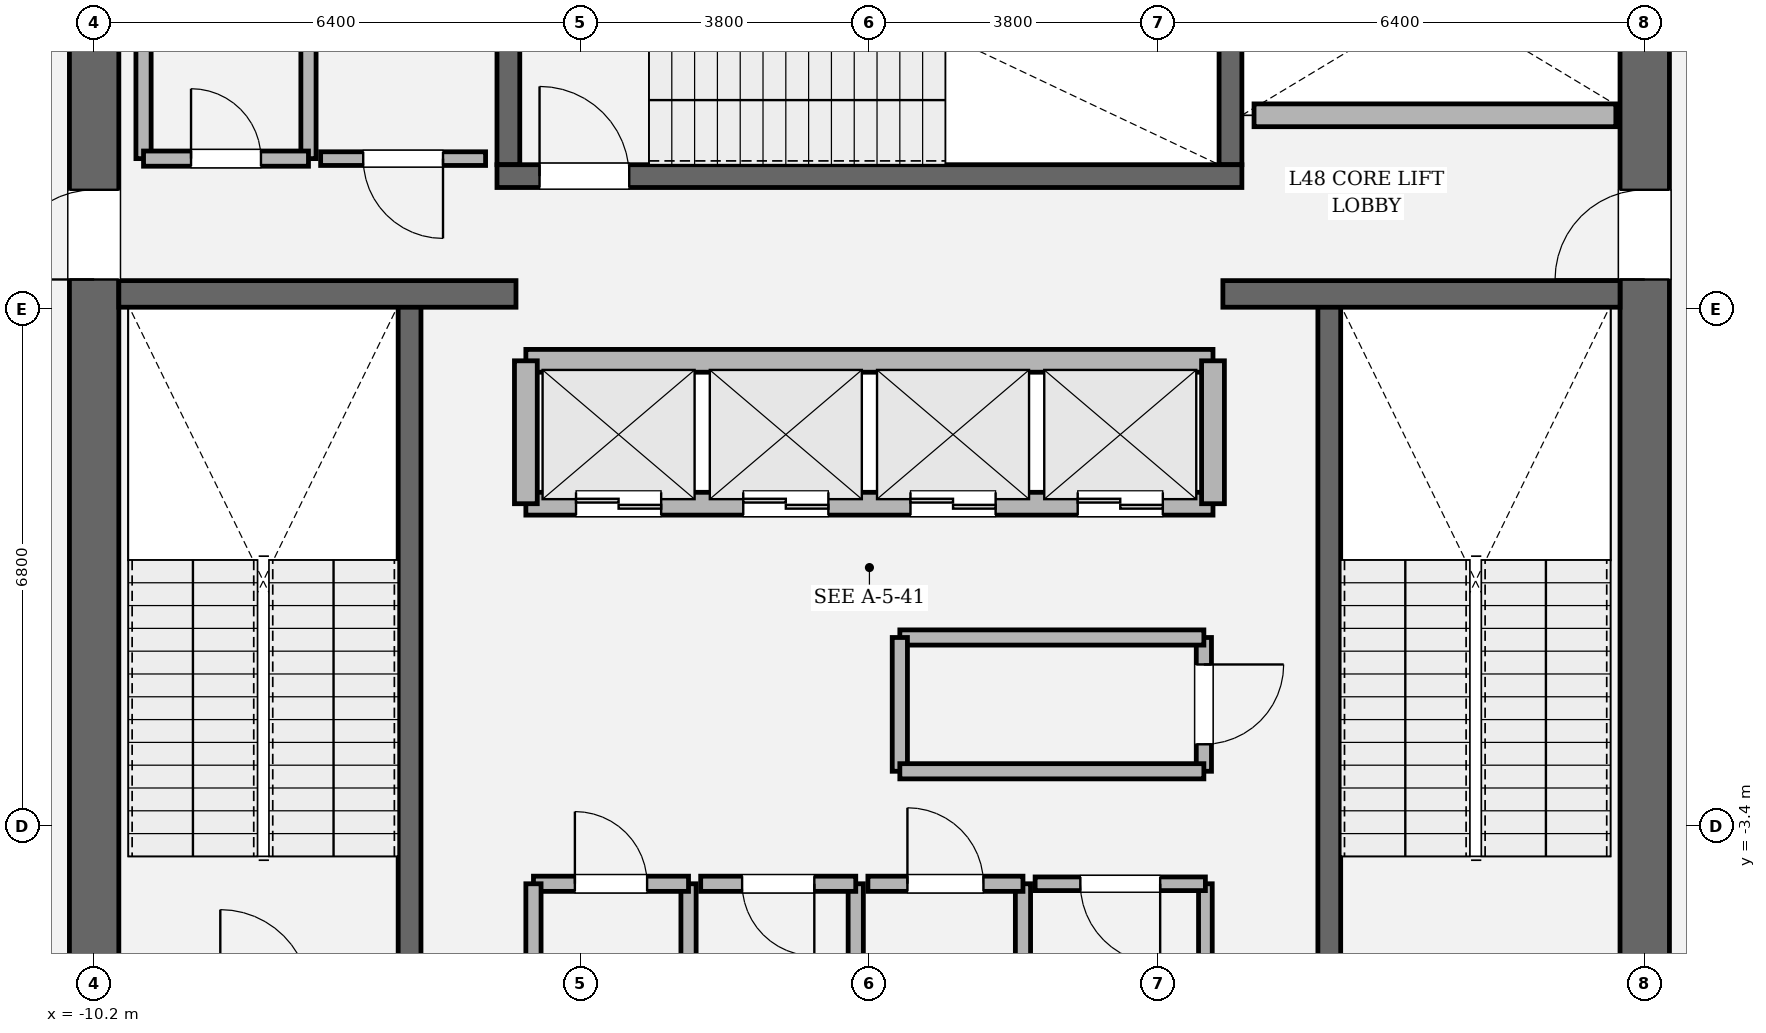
"""IFC4 building model, lengths in metres.
Left out: names, types, materials, properties, quantities, classifications, styles, units other than length and angle.
Written with IfcOpenShell. Run it as: python <this file> out.ifc"""

import sys

from ifc_helpers import new_model, si_unit, direction, frame, frame_2d, origin, place, context, subcontext, project, spatial, rectangle, extrude, element, fill, save


model = new_model("IFC4")
c1 = context("Model", 3, precision=1e-05, world=origin(), true_north=direction((0.0, 1.0)))
c2 = subcontext(c1, "Body", "Model", "MODEL_VIEW")
j1 = project(units=[si_unit("LENGTHUNIT", "METRE"), si_unit("PLANEANGLEUNIT", "RADIAN")], contexts=[c1])
p1 = place(None, origin())
s1 = spatial("IfcSite", under=j1, at=p1, CompositionType="ELEMENT")
p2 = place(p1, origin())
s2 = spatial("IfcBuilding", under=s1, at=p2, CompositionType="ELEMENT")
p3 = place(p2, frame((0.0, 0.0, 204.6)))
s3 = spatial("IfcBuildingStorey", under=s2, at=p3, CompositionType="ELEMENT", Elevation=204.6)
p4 = place(p3, frame((-10.2, -8.875, 0.0), z_axis=(0.0, 0.0, 1.0), x_axis=(0.0, 1.0, 0.0)))
e1 = element("IfcWall", 1, at=p4, inside=s3, PredefinedType="SHEAR", context=c2, shape_type="SweptSolid", body=[
    extrude(rectangle(XDim=17.75, YDim=0.65, at=frame_2d((8.875, 0.0))), origin(), (0.0, 0.0, 1.0), 4.05),
])
p5 = place(p4, frame((12.665, 0.0, 0.0)))
e2 = element("IfcOpeningElement", 2, at=p5, cuts=e1, PredefinedType="OPENING", context=c2, shape_type="SweptSolid", body=[
    extrude(rectangle(XDim=1.18, YDim=2.2, at=frame_2d((0.59, 1.1))), frame((0.0, 0.335, 0.0), z_axis=(0.0, -1.0, 0.0), x_axis=(1.0, 0.0, 0.0)), (0.0, 0.0, 1.0), 0.67),
])
p6 = place(p3, frame((10.2, 8.875, 0.0), z_axis=(0.0, 0.0, 1.0), x_axis=(0.0, -1.0, 0.0)))
e3 = element("IfcWall", 3, at=p6, inside=s3, PredefinedType="SHEAR", context=c2, shape_type="SweptSolid", body=[
    extrude(rectangle(XDim=17.75, YDim=0.65, at=frame_2d((8.875, 0.0))), origin(), (0.0, 0.0, 1.0), 4.05),
])
p7 = place(p6, frame((3.905, 0.0, 0.0)))
e4 = element("IfcOpeningElement", 4, at=p7, cuts=e3, PredefinedType="OPENING", context=c2, shape_type="SweptSolid", body=[
    extrude(rectangle(XDim=1.18, YDim=2.2, at=frame_2d((0.59, 1.1))), frame((0.0, 0.335, 0.0), z_axis=(0.0, -1.0, 0.0), x_axis=(1.0, 0.0, 0.0)), (0.0, 0.0, 1.0), 0.67),
])
for number, where, z_axis, x_axis in (
    (5, (-6.05, -5.5, 0.0), (0.0, 0.0, 1.0), (0.0, 1.0, 0.0)),
    (6, (6.05, 3.45, 0.0), (0.0, 0.0, 1.0), (0.0, -1.0, 0.0)),
):
    element("IfcWall", number, at=place(p3, frame(where, z_axis=z_axis, x_axis=x_axis)), inside=s3, PredefinedType="SOLIDWALL", context=c2, shape_type="SweptSolid", body=[
        extrude(rectangle(XDim=8.95, YDim=0.3, at=frame_2d((4.475, 0.0))), origin(), (0.0, 0.0, 1.0), 4.05),
    ])
for number, where, z_axis, x_axis in (
    (7, (-4.75, 5.3, 0.0), (0.0, 0.0, 1.0), (0.0, 1.0, 0.0)),
    (8, (4.75, 8.875, 0.0), (0.0, 0.0, 1.0), (0.0, -1.0, 0.0)),
):
    element("IfcWall", number, at=place(p3, frame(where, z_axis=z_axis, x_axis=x_axis)), inside=s3, PredefinedType="SOLIDWALL", context=c2, shape_type="SweptSolid", body=[
        extrude(rectangle(XDim=3.575, YDim=0.3, at=frame_2d((1.788, 0.0))), origin(), (0.0, 0.0, 1.0), 4.05),
    ])
p8 = place(p3, frame((-4.9, 5.15, 0.0), z_axis=(0.0, 0.0, 1.0), x_axis=(1.0, 0.0, 0.0)))
e9 = element("IfcWall", 9, at=p8, inside=s3, PredefinedType="SOLIDWALL", context=c2, shape_type="SweptSolid", body=[
    extrude(rectangle(XDim=9.8, YDim=0.3, at=frame_2d((4.9, 0.0))), origin(), (0.0, 0.0, 1.0), 4.05),
])
p9 = place(p8, frame((0.56, 0.0, 0.0)))
e10 = element("IfcOpeningElement", 10, at=p9, cuts=e9, PredefinedType="OPENING", context=c2, shape_type="SweptSolid", body=[
    extrude(rectangle(XDim=1.18, YDim=2.2, at=frame_2d((0.59, 1.1))), frame((0.0, 0.16, 0.0), z_axis=(0.0, -1.0, 0.0), x_axis=(1.0, 0.0, 0.0)), (0.0, 0.0, 1.0), 0.32),
])
for number, where, z_axis, x_axis in (
    (11, (-9.875, 3.6, 0.0), (0.0, 0.0, 1.0), (1.0, 0.0, 0.0)),
    (12, (4.65, 3.6, 0.0), (0.0, 0.0, 1.0), (1.0, 0.0, 0.0)),
):
    element("IfcWall", number, at=place(p3, frame(where, z_axis=z_axis, x_axis=x_axis)), inside=s3, PredefinedType="SOLIDWALL", context=c2, shape_type="SweptSolid", body=[
        extrude(rectangle(XDim=5.225, YDim=0.35, at=frame_2d((2.613, 0.0))), origin(), (0.0, 0.0, 1.0), 4.05),
    ])
p10 = place(p3, frame((-4.52, 0.84, 0.0), z_axis=(0.0, 0.0, 1.0), x_axis=(1.0, 0.0, 0.0)))
e13 = element("IfcWall", 13, at=p10, inside=s3, PredefinedType="SOLIDWALL", context=c2, shape_type="SweptSolid", body=[
    extrude(rectangle(XDim=9.04, YDim=0.3, at=frame_2d((4.52, 0.0))), origin(), (0.0, 0.0, 1.0), 3.83),
])
p11 = place(p10, frame((0.66, 0.0, 0.0)))
e14 = element("IfcOpeningElement", 14, at=p11, cuts=e13, PredefinedType="OPENING", context=c2, shape_type="SweptSolid", body=[
    extrude(rectangle(XDim=1.12, YDim=2.25, at=frame_2d((0.56, 1.125))), frame((0.0, 0.16, 0.0), z_axis=(0.0, -1.0, 0.0), x_axis=(1.0, 0.0, 0.0)), (0.0, 0.0, 1.0), 0.32),
])
p12 = place(p10, frame((2.86, 0.0, 0.0)))
e15 = element("IfcOpeningElement", 15, at=p12, cuts=e13, PredefinedType="OPENING", context=c2, shape_type="SweptSolid", body=[
    extrude(rectangle(XDim=1.12, YDim=2.25, at=frame_2d((0.56, 1.125))), frame((0.0, 0.16, 0.0), z_axis=(0.0, -1.0, 0.0), x_axis=(1.0, 0.0, 0.0)), (0.0, 0.0, 1.0), 0.32),
])
p13 = place(p10, frame((5.06, 0.0, 0.0)))
e16 = element("IfcOpeningElement", 16, at=p13, cuts=e13, PredefinedType="OPENING", context=c2, shape_type="SweptSolid", body=[
    extrude(rectangle(XDim=1.12, YDim=2.25, at=frame_2d((0.56, 1.125))), frame((0.0, 0.16, 0.0), z_axis=(0.0, -1.0, 0.0), x_axis=(1.0, 0.0, 0.0)), (0.0, 0.0, 1.0), 0.32),
])
p14 = place(p10, frame((7.26, 0.0, 0.0)))
e17 = element("IfcOpeningElement", 17, at=p14, cuts=e13, PredefinedType="OPENING", context=c2, shape_type="SweptSolid", body=[
    extrude(rectangle(XDim=1.12, YDim=2.25, at=frame_2d((0.56, 1.125))), frame((0.0, 0.16, 0.0), z_axis=(0.0, -1.0, 0.0), x_axis=(1.0, 0.0, 0.0)), (0.0, 0.0, 1.0), 0.32),
])
p15 = place(p3, frame((-4.52, 2.72, 0.0), z_axis=(0.0, 0.0, 1.0), x_axis=(1.0, 0.0, 0.0)))
e18 = element("IfcWall", 18, at=p15, inside=s3, PredefinedType="SOLIDWALL", context=c2, shape_type="SweptSolid", body=[
    extrude(rectangle(XDim=9.04, YDim=0.3, at=frame_2d((4.52, 0.0))), origin(), (0.0, 0.0, 1.0), 3.83),
])
for number, where, z_axis, x_axis in (
    (19, (-4.52, 0.84, 0.0), (0.0, 0.0, 1.0), (0.0, 1.0, 0.0)),
    (20, (4.52, 0.84, 0.0), (0.0, 0.0, 1.0), (0.0, 1.0, 0.0)),
):
    element("IfcWall", number, at=place(p3, frame(where, z_axis=z_axis, x_axis=x_axis)), inside=s3, PredefinedType="SOLIDWALL", context=c2, shape_type="SweptSolid", body=[
        extrude(rectangle(XDim=1.88, YDim=0.3, at=frame_2d((0.94, 0.0))), origin(), (0.0, 0.0, 1.0), 3.83),
    ])
p16 = place(p3, frame((5.06, 5.95, 0.0), z_axis=(0.0, 0.0, 1.0), x_axis=(1.0, 0.0, 0.0)))
e21 = element("IfcWall", 21, at=p16, inside=s3, PredefinedType="SOLIDWALL", context=c2, shape_type="SweptSolid", body=[
    extrude(rectangle(XDim=4.76, YDim=0.3, at=frame_2d((2.38, 0.0))), origin(), (0.0, 0.0, 1.0), 3.83),
])
p17 = place(p3, frame((-2.38, -5.9, 0.0), z_axis=(0.0, 0.0, 1.0), x_axis=(0.0, 1.0, 0.0)))
e22 = element("IfcWall", 22, at=p17, inside=s3, PredefinedType="SOLIDWALL", context=c2, shape_type="SweptSolid", body=[
    extrude(rectangle(XDim=1.74, YDim=0.2, at=frame_2d((0.87, 0.0))), origin(), (0.0, 0.0, 1.0), 3.83),
])
p18 = place(p3, frame((-2.38, -4.16, 0.0), z_axis=(0.0, 0.0, 1.0), x_axis=(-1.0, 0.0, 0.0)))
e23 = element("IfcWall", 23, at=p18, inside=s3, PredefinedType="SOLIDWALL", context=c2, shape_type="SweptSolid", body=[
    extrude(rectangle(XDim=2.04, YDim=0.2, at=frame_2d((1.02, 0.0))), origin(), (0.0, 0.0, 1.0), 3.83),
])
p19 = place(p18, frame((0.545, 0.0, 0.0)))
e24 = element("IfcOpeningElement", 24, at=p19, cuts=e23, PredefinedType="OPENING", context=c2, shape_type="SweptSolid", body=[
    extrude(rectangle(XDim=0.95, YDim=2.15, at=frame_2d((0.475, 1.075))), frame((0.0, 0.11, 0.0), z_axis=(0.0, -1.0, 0.0), x_axis=(1.0, 0.0, 0.0)), (0.0, 0.0, 1.0), 0.22),
])
for number, where, z_axis, x_axis in (
    (25, (-4.42, -4.16, 0.0), (0.0, 0.0, 1.0), (0.0, -1.0, 0.0)),
    (26, (-0.18, -5.9, 0.0), (0.0, 0.0, 1.0), (0.0, 1.0, 0.0)),
):
    element("IfcWall", number, at=place(p3, frame(where, z_axis=z_axis, x_axis=x_axis)), inside=s3, PredefinedType="SOLIDWALL", context=c2, shape_type="SweptSolid", body=[
        extrude(rectangle(XDim=1.74, YDim=0.2, at=frame_2d((0.87, 0.0))), origin(), (0.0, 0.0, 1.0), 3.83),
    ])
p20 = place(p3, frame((-0.18, -4.16, 0.0), z_axis=(0.0, 0.0, 1.0), x_axis=(-1.0, 0.0, 0.0)))
e27 = element("IfcWall", 27, at=p20, inside=s3, PredefinedType="SOLIDWALL", context=c2, shape_type="SweptSolid", body=[
    extrude(rectangle(XDim=2.04, YDim=0.2, at=frame_2d((1.02, 0.0))), origin(), (0.0, 0.0, 1.0), 3.83),
])
p21 = place(p20, frame((0.545, 0.0, 0.0)))
e28 = element("IfcOpeningElement", 28, at=p21, cuts=e27, PredefinedType="OPENING", context=c2, shape_type="SweptSolid", body=[
    extrude(rectangle(XDim=0.95, YDim=2.15, at=frame_2d((0.475, 1.075))), frame((0.0, 0.11, 0.0), z_axis=(0.0, -1.0, 0.0), x_axis=(1.0, 0.0, 0.0)), (0.0, 0.0, 1.0), 0.22),
])
p22 = place(p3, frame((2.02, -5.9, 0.0), z_axis=(0.0, 0.0, 1.0), x_axis=(0.0, 1.0, 0.0)))
e29 = element("IfcWall", 29, at=p22, inside=s3, PredefinedType="SOLIDWALL", context=c2, shape_type="SweptSolid", body=[
    extrude(rectangle(XDim=1.74, YDim=0.2, at=frame_2d((0.87, 0.0))), origin(), (0.0, 0.0, 1.0), 3.83),
])
p23 = place(p3, frame((2.02, -4.16, 0.0), z_axis=(0.0, 0.0, 1.0), x_axis=(-1.0, 0.0, 0.0)))
e30 = element("IfcWall", 30, at=p23, inside=s3, PredefinedType="SOLIDWALL", context=c2, shape_type="SweptSolid", body=[
    extrude(rectangle(XDim=2.04, YDim=0.2, at=frame_2d((1.02, 0.0))), origin(), (0.0, 0.0, 1.0), 3.83),
])
p24 = place(p23, frame((0.52, 0.0, 0.0)))
e31 = element("IfcOpeningElement", 31, at=p24, cuts=e30, PredefinedType="OPENING", context=c2, shape_type="SweptSolid", body=[
    extrude(rectangle(XDim=1.0, YDim=2.15, at=frame_2d((0.5, 1.075))), frame((0.0, 0.11, 0.0), z_axis=(0.0, -1.0, 0.0), x_axis=(1.0, 0.0, 0.0)), (0.0, 0.0, 1.0), 0.22),
])
p25 = place(p3, frame((4.42, -5.9, 0.0), z_axis=(0.0, 0.0, 1.0), x_axis=(0.0, 1.0, 0.0)))
e32 = element("IfcWall", 32, at=p25, inside=s3, PredefinedType="PARTITIONING", context=c2, shape_type="SweptSolid", body=[
    extrude(rectangle(XDim=1.74, YDim=0.18, at=frame_2d((0.87, 0.0))), origin(), (0.0, 0.0, 1.0), 3.83),
])
p26 = place(p3, frame((4.42, -4.16, 0.0), z_axis=(0.0, 0.0, 1.0), x_axis=(-1.0, 0.0, 0.0)))
e33 = element("IfcWall", 33, at=p26, inside=s3, PredefinedType="PARTITIONING", context=c2, shape_type="SweptSolid", body=[
    extrude(rectangle(XDim=2.24, YDim=0.18, at=frame_2d((1.12, 0.0))), origin(), (0.0, 0.0, 1.0), 3.83),
])
p27 = place(p26, frame((0.595, 0.0, 0.0)))
e34 = element("IfcOpeningElement", 34, at=p27, cuts=e33, PredefinedType="OPENING", context=c2, shape_type="SweptSolid", body=[
    extrude(rectangle(XDim=1.05, YDim=2.2, at=frame_2d((0.525, 1.1))), frame((0.0, 0.1, 0.0), z_axis=(0.0, -1.0, 0.0), x_axis=(1.0, 0.0, 0.0)), (0.0, 0.0, 1.0), 0.2),
])
p28 = place(p3, frame((4.4, -2.68, 0.0), z_axis=(0.0, 0.0, 1.0), x_axis=(0.0, 1.0, 0.0)))
e35 = element("IfcWall", 35, at=p28, inside=s3, PredefinedType="SOLIDWALL", context=c2, shape_type="SweptSolid", body=[
    extrude(rectangle(XDim=1.76, YDim=0.2, at=frame_2d((0.88, 0.0))), origin(), (0.0, 0.0, 1.0), 3.83),
])
p29 = place(p28, frame((0.355, 0.0, 0.0)))
e36 = element("IfcOpeningElement", 36, at=p29, cuts=e35, PredefinedType="OPENING", context=c2, shape_type="SweptSolid", body=[
    extrude(rectangle(XDim=1.05, YDim=2.2, at=frame_2d((0.525, 1.1))), frame((0.0, 0.11, 0.0), z_axis=(0.0, -1.0, 0.0), x_axis=(1.0, 0.0, 0.0)), (0.0, 0.0, 1.0), 0.22),
])
p30 = place(p3, frame((4.4, -0.92, 0.0), z_axis=(0.0, 0.0, 1.0), x_axis=(-1.0, 0.0, 0.0)))
e37 = element("IfcWall", 37, at=p30, inside=s3, PredefinedType="SOLIDWALL", context=c2, shape_type="SweptSolid", body=[
    extrude(rectangle(XDim=4.0, YDim=0.2, at=frame_2d((2.0, 0.0))), origin(), (0.0, 0.0, 1.0), 3.83),
])
p31 = place(p3, frame((0.4, -0.92, 0.0), z_axis=(0.0, 0.0, 1.0), x_axis=(0.0, -1.0, 0.0)))
e38 = element("IfcWall", 38, at=p31, inside=s3, PredefinedType="SOLIDWALL", context=c2, shape_type="SweptSolid", body=[
    extrude(rectangle(XDim=1.76, YDim=0.2, at=frame_2d((0.88, 0.0))), origin(), (0.0, 0.0, 1.0), 3.83),
])
p32 = place(p3, frame((0.4, -2.68, 0.0), z_axis=(0.0, 0.0, 1.0), x_axis=(1.0, 0.0, 0.0)))
e39 = element("IfcWall", 39, at=p32, inside=s3, PredefinedType="SOLIDWALL", context=c2, shape_type="SweptSolid", body=[
    extrude(rectangle(XDim=4.0, YDim=0.2, at=frame_2d((2.0, 0.0))), origin(), (0.0, 0.0, 1.0), 3.83),
])
for number, where, z_axis, x_axis in (
    (40, (-7.38, 5.38, 0.0), (0.0, 0.0, 1.0), (0.0, 1.0, 0.0)),
    (41, (-9.55, 8.65, 0.0), (0.0, 0.0, 1.0), (0.0, -1.0, 0.0)),
):
    element("IfcWall", number, at=place(p3, frame(where, z_axis=z_axis, x_axis=x_axis)), inside=s3, PredefinedType="SOLIDWALL", context=c2, shape_type="SweptSolid", body=[
        extrude(rectangle(XDim=3.27, YDim=0.2, at=frame_2d((1.635, 0.0))), origin(), (0.0, 0.0, 1.0), 3.83),
    ])
p33 = place(p3, frame((-9.55, 5.38, 0.0), z_axis=(0.0, 0.0, 1.0), x_axis=(1.0, 0.0, 0.0)))
e42 = element("IfcWall", 42, at=p33, inside=s3, PredefinedType="SOLIDWALL", context=c2, shape_type="SweptSolid", body=[
    extrude(rectangle(XDim=2.17, YDim=0.2, at=frame_2d((1.085, 0.0))), origin(), (0.0, 0.0, 1.0), 3.83),
])
p34 = place(p33, frame((0.625, 0.0, 0.0)))
e43 = element("IfcOpeningElement", 43, at=p34, cuts=e42, PredefinedType="OPENING", context=c2, shape_type="SweptSolid", body=[
    extrude(rectangle(XDim=0.92, YDim=2.1, at=frame_2d((0.46, 1.05))), frame((0.0, 0.11, 0.0), z_axis=(0.0, -1.0, 0.0), x_axis=(1.0, 0.0, 0.0)), (0.0, 0.0, 1.0), 0.22),
])
p35 = place(p3, frame((-7.22, 5.38, 0.0), z_axis=(0.0, 0.0, 1.0), x_axis=(1.0, 0.0, 0.0)))
e44 = element("IfcWall", 44, at=p35, inside=s3, PredefinedType="PARTITIONING", context=c2, shape_type="SweptSolid", body=[
    extrude(rectangle(XDim=2.17, YDim=0.18, at=frame_2d((1.085, 0.0))), origin(), (0.0, 0.0, 1.0), 3.83),
])
p36 = place(p35, frame((0.56, 0.0, 0.0)))
e45 = element("IfcOpeningElement", 45, at=p36, cuts=e44, PredefinedType="OPENING", context=c2, shape_type="SweptSolid", body=[
    extrude(rectangle(XDim=1.05, YDim=2.2, at=frame_2d((0.525, 1.1))), frame((0.0, 0.1, 0.0), z_axis=(0.0, -1.0, 0.0), x_axis=(1.0, 0.0, 0.0)), (0.0, 0.0, 1.0), 0.2),
])
p37 = place(p9, origin())
e46 = element("IfcDoor", 46, at=p37, inside=s3, OperationType="SINGLE_SWING_LEFT", PredefinedType="DOOR", context=c2, shape_type="SweptSolid", body=[
    extrude(rectangle(XDim=1.18, YDim=2.2, at=frame_2d((0.59, 1.1))), frame((0.0, 0.025, 0.0), z_axis=(0.0, -1.0, 0.0), x_axis=(1.0, 0.0, 0.0)), (0.0, 0.0, 1.0), 0.05),
])
fill(e10, e46)
p38 = place(p5, origin())
e47 = element("IfcDoor", 47, at=p38, inside=s3, OperationType="SINGLE_SWING_LEFT", PredefinedType="DOOR", context=c2, shape_type="SweptSolid", body=[
    extrude(rectangle(XDim=1.18, YDim=2.2, at=frame_2d((0.59, 1.1))), frame((0.0, 0.025, 0.0), z_axis=(0.0, -1.0, 0.0), x_axis=(1.0, 0.0, 0.0)), (0.0, 0.0, 1.0), 0.05),
])
fill(e2, e47)
p39 = place(p7, origin())
e48 = element("IfcDoor", 48, at=p39, inside=s3, OperationType="SINGLE_SWING_RIGHT", PredefinedType="DOOR", context=c2, shape_type="SweptSolid", body=[
    extrude(rectangle(XDim=1.18, YDim=2.2, at=frame_2d((0.59, 1.1))), frame((0.0, 0.025, 0.0), z_axis=(0.0, -1.0, 0.0), x_axis=(1.0, 0.0, 0.0)), (0.0, 0.0, 1.0), 0.05),
])
fill(e4, e48)
p40 = place(p11, origin())
e49 = element("IfcDoor", 49, at=p40, inside=s3, OperationType="DOUBLE_DOOR_SLIDING", PredefinedType="DOOR", context=c2, shape_type="SweptSolid", body=[
    extrude(rectangle(XDim=1.12, YDim=2.25, at=frame_2d((0.56, 1.125))), frame((0.0, 0.025, 0.0), z_axis=(0.0, -1.0, 0.0), x_axis=(1.0, 0.0, 0.0)), (0.0, 0.0, 1.0), 0.05),
])
fill(e14, e49)
p41 = place(p12, origin())
e50 = element("IfcDoor", 50, at=p41, inside=s3, OperationType="DOUBLE_DOOR_SLIDING", PredefinedType="DOOR", context=c2, shape_type="SweptSolid", body=[
    extrude(rectangle(XDim=1.12, YDim=2.25, at=frame_2d((0.56, 1.125))), frame((0.0, 0.025, 0.0), z_axis=(0.0, -1.0, 0.0), x_axis=(1.0, 0.0, 0.0)), (0.0, 0.0, 1.0), 0.05),
])
fill(e15, e50)
p42 = place(p13, origin())
e51 = element("IfcDoor", 51, at=p42, inside=s3, OperationType="DOUBLE_DOOR_SLIDING", PredefinedType="DOOR", context=c2, shape_type="SweptSolid", body=[
    extrude(rectangle(XDim=1.12, YDim=2.25, at=frame_2d((0.56, 1.125))), frame((0.0, 0.025, 0.0), z_axis=(0.0, -1.0, 0.0), x_axis=(1.0, 0.0, 0.0)), (0.0, 0.0, 1.0), 0.05),
])
fill(e16, e51)
p43 = place(p14, origin())
e52 = element("IfcDoor", 52, at=p43, inside=s3, OperationType="DOUBLE_DOOR_SLIDING", PredefinedType="DOOR", context=c2, shape_type="SweptSolid", body=[
    extrude(rectangle(XDim=1.12, YDim=2.25, at=frame_2d((0.56, 1.125))), frame((0.0, 0.025, 0.0), z_axis=(0.0, -1.0, 0.0), x_axis=(1.0, 0.0, 0.0)), (0.0, 0.0, 1.0), 0.05),
])
fill(e17, e52)
p44 = place(p19, origin())
e53 = element("IfcDoor", 53, at=p44, inside=s3, OperationType="SINGLE_SWING_RIGHT", PredefinedType="DOOR", context=c2, shape_type="SweptSolid", body=[
    extrude(rectangle(XDim=0.95, YDim=2.15, at=frame_2d((0.475, 1.075))), frame((0.0, 0.025, 0.0), z_axis=(0.0, -1.0, 0.0), x_axis=(1.0, 0.0, 0.0)), (0.0, 0.0, 1.0), 0.05),
])
fill(e24, e53)
p45 = place(p21, origin())
e54 = element("IfcDoor", 54, at=p45, inside=s3, OperationType="SINGLE_SWING_LEFT", PredefinedType="DOOR", context=c2, shape_type="SweptSolid", body=[
    extrude(rectangle(XDim=0.95, YDim=2.15, at=frame_2d((0.475, 1.075))), frame((0.0, 0.025, 0.0), z_axis=(0.0, -1.0, 0.0), x_axis=(1.0, 0.0, 0.0)), (0.0, 0.0, 1.0), 0.05),
])
fill(e28, e54)
p46 = place(p24, origin())
e55 = element("IfcDoor", 55, at=p46, inside=s3, OperationType="SINGLE_SWING_RIGHT", PredefinedType="DOOR", context=c2, shape_type="SweptSolid", body=[
    extrude(rectangle(XDim=1.0, YDim=2.15, at=frame_2d((0.5, 1.075))), frame((0.0, 0.025, 0.0), z_axis=(0.0, -1.0, 0.0), x_axis=(1.0, 0.0, 0.0)), (0.0, 0.0, 1.0), 0.05),
])
fill(e31, e55)
p47 = place(p27, origin())
e56 = element("IfcDoor", 56, at=p47, inside=s3, OperationType="SINGLE_SWING_LEFT", PredefinedType="DOOR", context=c2, shape_type="SweptSolid", body=[
    extrude(rectangle(XDim=1.05, YDim=2.2, at=frame_2d((0.525, 1.1))), frame((0.0, 0.025, 0.0), z_axis=(0.0, -1.0, 0.0), x_axis=(1.0, 0.0, 0.0)), (0.0, 0.0, 1.0), 0.05),
])
fill(e34, e56)
p48 = place(p29, origin())
e57 = element("IfcDoor", 57, at=p48, inside=s3, OperationType="SINGLE_SWING_RIGHT", PredefinedType="DOOR", context=c2, shape_type="SweptSolid", body=[
    extrude(rectangle(XDim=1.05, YDim=2.2, at=frame_2d((0.525, 1.1))), frame((0.0, 0.025, 0.0), z_axis=(0.0, -1.0, 0.0), x_axis=(1.0, 0.0, 0.0)), (0.0, 0.0, 1.0), 0.05),
])
fill(e36, e57)
p49 = place(p34, origin())
e58 = element("IfcDoor", 58, at=p49, inside=s3, OperationType="SINGLE_SWING_LEFT", PredefinedType="DOOR", context=c2, shape_type="SweptSolid", body=[
    extrude(rectangle(XDim=0.92, YDim=2.1, at=frame_2d((0.46, 1.05))), frame((0.0, 0.025, 0.0), z_axis=(0.0, -1.0, 0.0), x_axis=(1.0, 0.0, 0.0)), (0.0, 0.0, 1.0), 0.05),
])
fill(e43, e58)
p50 = place(p36, origin())
e59 = element("IfcDoor", 59, at=p50, inside=s3, OperationType="SINGLE_SWING_RIGHT", PredefinedType="DOOR", context=c2, shape_type="SweptSolid", body=[
    extrude(rectangle(XDim=1.05, YDim=2.2, at=frame_2d((0.525, 1.1))), frame((0.0, 0.025, 0.0), z_axis=(0.0, -1.0, 0.0), x_axis=(1.0, 0.0, 0.0)), (0.0, 0.0, 1.0), 0.05),
])
fill(e45, e59)
save(model, sys.argv[1])
